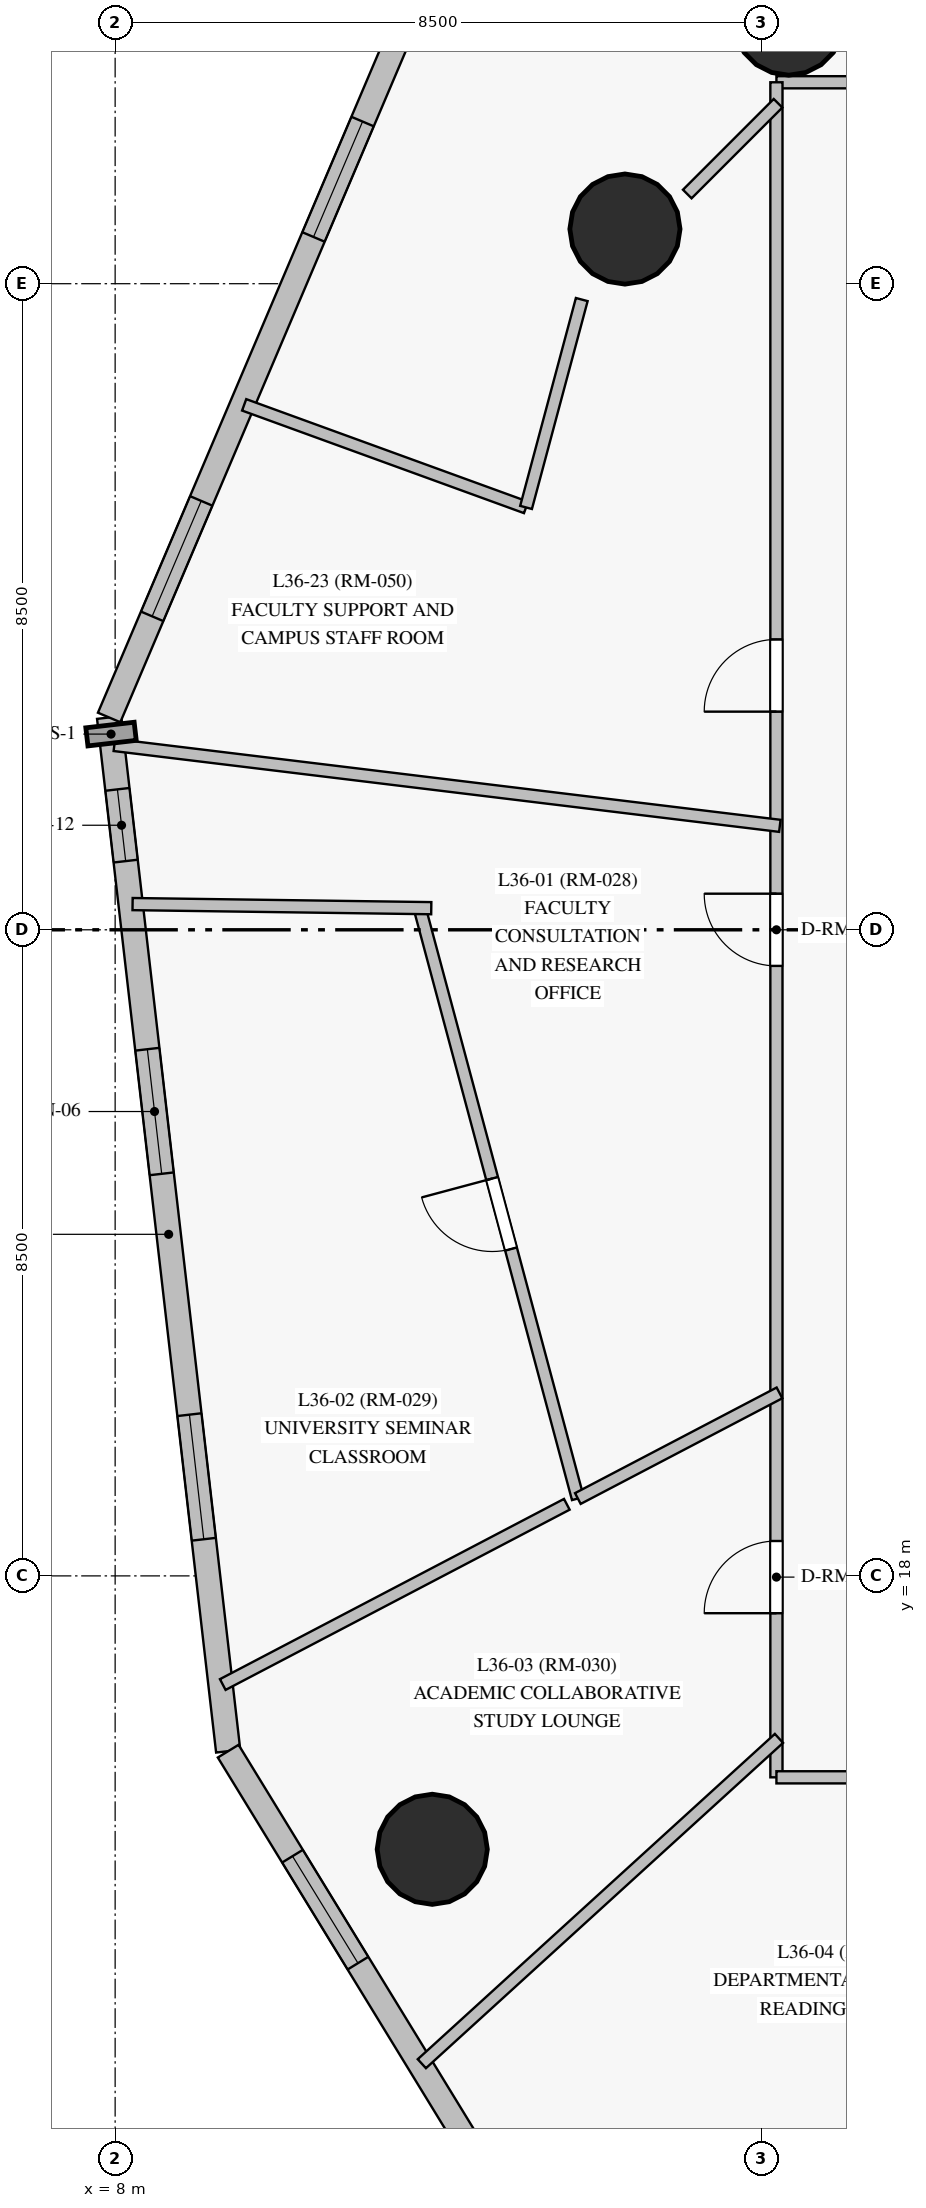
"""IFC4 building model, lengths in metres.
Left out: names, types, materials, properties, quantities, classifications, styles, units other than length and angle.
Written with IfcOpenShell. Run it as: python <this file> out.ifc"""

import sys

from ifc_helpers import new_model, si_unit, direction, frame, frame_2d, origin, origin_with_axes, origin_2d, place, context, subcontext, project, spatial, rectangle, circle, extrude, source, transform, mapped, element, fill, save


model = new_model("IFC4")
c1 = context("Model", 3, precision=1e-05, world=origin(), true_north=direction((0.0, 1.0)))
c2 = subcontext(c1, "Body", "Model", "MODEL_VIEW")
j1 = project(units=[si_unit("LENGTHUNIT", "METRE"), si_unit("PLANEANGLEUNIT", "RADIAN")], contexts=[c1])
p1 = place(None, origin())
s1 = spatial("IfcSite", under=j1, at=p1, CompositionType="ELEMENT")
p2 = place(p1, origin())
s2 = spatial("IfcBuilding", under=s1, at=p2, CompositionType="ELEMENT")
p3 = place(p2, frame((0.0, 0.0, 129.75)))
s3 = spatial("IfcBuildingStorey", under=s2, at=p3, CompositionType="ELEMENT", Elevation=129.75)
m1 = source(origin_with_axes(), c2, "Body", "SweptSolid", [
    extrude(circle(Radius=0.725, at=origin_2d()), origin(), (0.0, 0.0, 1.0), 3.05),
])
for number, where, z_axis, x_axis in (
    (1, (16.862, 38.468, 0.0), (0.0, 0.0, 1.0), (1.0, 0.0, 0.0)),
    (2, (14.707, 35.719, 0.0), (0.0, 0.0, 1.0), (1.0, 0.0, 0.0)),
    (3, (12.172, 14.403, 0.0), (0.0, 0.0, 1.0), (1.0, 0.0, 0.0)),
):
    element("IfcColumn", number, at=place(p3, frame(where, z_axis=z_axis, x_axis=x_axis)), inside=s3, PredefinedType="COLUMN", context=c2, shape_type="MappedRepresentation", body=[
        mapped(m1, transform((0.0, 0.0, 0.0), scale=1.0)),
    ])
p4 = place(p3, frame((7.921, 29.293, 0.0), z_axis=(0.0, 0.0, 1.0), x_axis=(0.114427793252, -0.993431567916, 0.0)))
e4 = element("IfcWall", 4, at=p4, inside=s3, PredefinedType="SOLIDWALL", context=c2, shape_type="SweptSolid", body=[
    extrude(rectangle(XDim=13.689, YDim=0.32, at=frame_2d((6.844, 0.0))), origin(), (0.0, 0.0, 1.0), 2.825),
])
p5 = place(p4, frame((0.952, 0.0, 0.85)))
e5 = element("IfcOpeningElement", 5, at=p5, cuts=e4, PredefinedType="OPENING", context=c2, shape_type="SweptSolid", body=[
    extrude(rectangle(XDim=0.95, YDim=1.5, at=frame_2d((0.475, 0.75))), frame((0.0, 0.17, 0.0), z_axis=(0.0, -1.0, 0.0), x_axis=(1.0, 0.0, 0.0)), (0.0, 0.0, 1.0), 0.34),
])
p6 = place(p4, frame((4.393, 0.0, 0.85)))
e6 = element("IfcOpeningElement", 6, at=p6, cuts=e4, PredefinedType="OPENING", context=c2, shape_type="SweptSolid", body=[
    extrude(rectangle(XDim=1.65, YDim=1.65, at=frame_2d((0.825, 0.825))), frame((0.0, 0.17, 0.0), z_axis=(0.0, -1.0, 0.0), x_axis=(1.0, 0.0, 0.0)), (0.0, 0.0, 1.0), 0.34),
])
p7 = place(p4, frame((9.233, 0.0, 0.85)))
e7 = element("IfcOpeningElement", 7, at=p7, cuts=e4, PredefinedType="OPENING", context=c2, shape_type="SweptSolid", body=[
    extrude(rectangle(XDim=1.65, YDim=1.65, at=frame_2d((0.825, 0.825))), frame((0.0, 0.17, 0.0), z_axis=(0.0, -1.0, 0.0), x_axis=(1.0, 0.0, 0.0)), (0.0, 0.0, 1.0), 0.34),
])
p8 = place(p3, frame((9.487, 15.694, 0.0), z_axis=(0.0, 0.0, 1.0), x_axis=(0.522110215284, -0.852878023574, 0.0)))
e8 = element("IfcWall", 8, at=p8, inside=s3, PredefinedType="SOLIDWALL", context=c2, shape_type="SweptSolid", body=[
    extrude(rectangle(XDim=9.466, YDim=0.32, at=frame_2d((4.733, 0.0))), origin(), (0.0, 0.0, 1.0), 2.825),
])
p9 = place(p8, frame((1.62, 0.0, 0.85)))
e9 = element("IfcOpeningElement", 9, at=p9, cuts=e8, PredefinedType="OPENING", context=c2, shape_type="SweptSolid", body=[
    extrude(rectangle(XDim=1.65, YDim=1.65, at=frame_2d((0.825, 0.825))), frame((0.0, 0.17, 0.0), z_axis=(0.0, -1.0, 0.0), x_axis=(1.0, 0.0, 0.0)), (0.0, 0.0, 1.0), 0.34),
])
p10 = place(p8, frame((6.293, 0.0, 0.85)))
e10 = element("IfcOpeningElement", 10, at=p10, cuts=e8, PredefinedType="OPENING", context=c2, shape_type="SweptSolid", body=[
    extrude(rectangle(XDim=1.65, YDim=1.65, at=frame_2d((0.825, 0.825))), frame((0.0, 0.17, 0.0), z_axis=(0.0, -1.0, 0.0), x_axis=(1.0, 0.0, 0.0)), (0.0, 0.0, 1.0), 0.34),
])
p11 = place(p3, frame((12.213, 39.386, 0.0), z_axis=(0.0, 0.0, 1.0), x_axis=(-0.391384325622, -0.920227314123, 0.0)))
e11 = element("IfcWall", 11, at=p11, inside=s3, PredefinedType="SOLIDWALL", context=c2, shape_type="SweptSolid", body=[
    extrude(rectangle(XDim=10.968, YDim=0.32, at=frame_2d((5.484, 0.0))), origin(), (0.0, 0.0, 1.0), 2.825),
])
p12 = place(p11, frame((2.448, 0.0, 0.85)))
e12 = element("IfcOpeningElement", 12, at=p12, cuts=e11, PredefinedType="OPENING", context=c2, shape_type="SweptSolid", body=[
    extrude(rectangle(XDim=1.65, YDim=1.65, at=frame_2d((0.825, 0.825))), frame((0.0, 0.17, 0.0), z_axis=(0.0, -1.0, 0.0), x_axis=(1.0, 0.0, 0.0)), (0.0, 0.0, 1.0), 0.34),
])
p13 = place(p11, frame((7.871, 0.0, 0.85)))
e13 = element("IfcOpeningElement", 13, at=p13, cuts=e11, PredefinedType="OPENING", context=c2, shape_type="SweptSolid", body=[
    extrude(rectangle(XDim=1.65, YDim=1.65, at=frame_2d((0.825, 0.825))), frame((0.0, 0.17, 0.0), z_axis=(0.0, -1.0, 0.0), x_axis=(1.0, 0.0, 0.0)), (0.0, 0.0, 1.0), 0.34),
])
p14 = place(p3, frame((16.7, 37.65, 0.0), z_axis=(0.0, 0.0, 1.0), x_axis=(1.0, 0.0, 0.0)))
e14 = element("IfcWall", 14, at=p14, inside=s3, PredefinedType="PARTITIONING", context=c2, shape_type="SweptSolid", body=[
    extrude(rectangle(XDim=23.5, YDim=0.16, at=frame_2d((11.75, 0.0))), origin(), (0.0, 0.0, 1.0), 2.325),
])
p15 = place(p14, frame((20.465, 0.0, 0.0)))
e15 = element("IfcOpeningElement", 15, at=p15, cuts=e14, PredefinedType="OPENING", context=c2, shape_type="SweptSolid", body=[
    extrude(rectangle(XDim=0.96, YDim=2.15, at=frame_2d((0.48, 1.075))), frame((0.0, 0.09, 0.0), z_axis=(0.0, -1.0, 0.0), x_axis=(1.0, 0.0, 0.0)), (0.0, 0.0, 1.0), 0.18),
])
p16 = place(p14, frame((17.06, 0.0, 0.0)))
e16 = element("IfcOpeningElement", 16, at=p16, cuts=e14, PredefinedType="OPENING", context=c2, shape_type="SweptSolid", body=[
    extrude(rectangle(XDim=0.95, YDim=2.15, at=frame_2d((0.475, 1.075))), frame((0.0, 0.09, 0.0), z_axis=(0.0, -1.0, 0.0), x_axis=(1.0, 0.0, 0.0)), (0.0, 0.0, 1.0), 0.18),
])
p17 = place(p14, frame((14.71, 0.0, 0.0)))
e17 = element("IfcOpeningElement", 17, at=p17, cuts=e14, PredefinedType="OPENING", context=c2, shape_type="SweptSolid", body=[
    extrude(rectangle(XDim=0.96, YDim=2.15, at=frame_2d((0.48, 1.075))), frame((0.0, 0.09, 0.0), z_axis=(0.0, -1.0, 0.0), x_axis=(1.0, 0.0, 0.0)), (0.0, 0.0, 1.0), 0.18),
])
p18 = place(p14, frame((10.785, 0.0, 0.0)))
e18 = element("IfcOpeningElement", 18, at=p18, cuts=e14, PredefinedType="OPENING", context=c2, shape_type="SweptSolid", body=[
    extrude(rectangle(XDim=0.95, YDim=2.15, at=frame_2d((0.475, 1.075))), frame((0.0, 0.09, 0.0), z_axis=(0.0, -1.0, 0.0), x_axis=(1.0, 0.0, 0.0)), (0.0, 0.0, 1.0), 0.18),
])
p19 = place(p14, frame((7.75, 0.0, 0.0)))
e19 = element("IfcOpeningElement", 19, at=p19, cuts=e14, PredefinedType="OPENING", context=c2, shape_type="SweptSolid", body=[
    extrude(rectangle(XDim=0.95, YDim=2.15, at=frame_2d((0.475, 1.075))), frame((0.0, 0.09, 0.0), z_axis=(0.0, -1.0, 0.0), x_axis=(1.0, 0.0, 0.0)), (0.0, 0.0, 1.0), 0.18),
])
p20 = place(p14, frame((6.195, 0.0, 0.0)))
e20 = element("IfcOpeningElement", 20, at=p20, cuts=e14, PredefinedType="OPENING", context=c2, shape_type="SweptSolid", body=[
    extrude(rectangle(XDim=0.86, YDim=2.1, at=frame_2d((0.43, 1.05))), frame((0.0, 0.09, 0.0), z_axis=(0.0, -1.0, 0.0), x_axis=(1.0, 0.0, 0.0)), (0.0, 0.0, 1.0), 0.18),
])
p21 = place(p3, frame((16.7, 15.35, 0.0), z_axis=(0.0, 0.0, 1.0), x_axis=(0.0, 1.0, 0.0)))
e21 = element("IfcWall", 21, at=p21, inside=s3, PredefinedType="PARTITIONING", context=c2, shape_type="SweptSolid", body=[
    extrude(rectangle(XDim=22.3, YDim=0.16, at=frame_2d((11.15, 0.0))), origin(), (0.0, 0.0, 1.0), 2.225),
])
p22 = place(p21, frame((10.675, 0.0, 0.0)))
e22 = element("IfcOpeningElement", 22, at=p22, cuts=e21, PredefinedType="OPENING", context=c2, shape_type="SweptSolid", body=[
    extrude(rectangle(XDim=0.95, YDim=2.15, at=frame_2d((0.475, 1.075))), frame((0.0, 0.09, 0.0), z_axis=(0.0, -1.0, 0.0), x_axis=(1.0, 0.0, 0.0)), (0.0, 0.0, 1.0), 0.18),
])
p23 = place(p21, frame((2.159, 0.0, 0.0)))
e23 = element("IfcOpeningElement", 23, at=p23, cuts=e21, PredefinedType="OPENING", context=c2, shape_type="SweptSolid", body=[
    extrude(rectangle(XDim=0.95, YDim=2.15, at=frame_2d((0.475, 1.075))), frame((0.0, 0.09, 0.0), z_axis=(0.0, -1.0, 0.0), x_axis=(1.0, 0.0, 0.0)), (0.0, 0.0, 1.0), 0.18),
])
p24 = place(p21, frame((14.02, 0.0, 0.0)))
e24 = element("IfcOpeningElement", 24, at=p24, cuts=e21, PredefinedType="OPENING", context=c2, shape_type="SweptSolid", body=[
    extrude(rectangle(XDim=0.95, YDim=2.15, at=frame_2d((0.475, 1.075))), frame((0.0, 0.09, 0.0), z_axis=(0.0, -1.0, 0.0), x_axis=(1.0, 0.0, 0.0)), (0.0, 0.0, 1.0), 0.18),
])
p25 = place(p3, frame((27.55, 15.35, 0.0), z_axis=(0.0, 0.0, 1.0), x_axis=(-1.0, 0.0, 0.0)))
e25 = element("IfcWall", 25, at=p25, inside=s3, PredefinedType="PARTITIONING", context=c2, shape_type="SweptSolid", body=[
    extrude(rectangle(XDim=10.85, YDim=0.16, at=frame_2d((5.425, 0.0))), origin(), (0.0, 0.0, 1.0), 2.325),
])
p26 = place(p25, frame((6.577, 0.0, 0.0)))
e26 = element("IfcOpeningElement", 26, at=p26, cuts=e25, PredefinedType="OPENING", context=c2, shape_type="SweptSolid", body=[
    extrude(rectangle(XDim=0.95, YDim=2.15, at=frame_2d((0.475, 1.075))), frame((0.0, 0.09, 0.0), z_axis=(0.0, -1.0, 0.0), x_axis=(1.0, 0.0, 0.0)), (0.0, 0.0, 1.0), 0.18),
])
p27 = place(p25, frame((3.512, 0.0, 0.0)))
e27 = element("IfcOpeningElement", 27, at=p27, cuts=e25, PredefinedType="OPENING", context=c2, shape_type="SweptSolid", body=[
    extrude(rectangle(XDim=0.95, YDim=2.15, at=frame_2d((0.475, 1.075))), frame((0.0, 0.09, 0.0), z_axis=(0.0, -1.0, 0.0), x_axis=(1.0, 0.0, 0.0)), (0.0, 0.0, 1.0), 0.18),
])
p28 = place(p25, frame((1.948, 0.0, 0.0)))
e28 = element("IfcOpeningElement", 28, at=p28, cuts=e25, PredefinedType="OPENING", context=c2, shape_type="SweptSolid", body=[
    extrude(rectangle(XDim=0.95, YDim=2.15, at=frame_2d((0.475, 1.075))), frame((0.0, 0.09, 0.0), z_axis=(0.0, -1.0, 0.0), x_axis=(1.0, 0.0, 0.0)), (0.0, 0.0, 1.0), 0.18),
])
p29 = place(p3, frame((22.207, 15.376, 0.0), z_axis=(0.0, 0.0, 1.0), x_axis=(-0.488271237189, -0.872691926704, 0.0)))
e29 = element("IfcWall", 29, at=p29, inside=s3, PredefinedType="PARTITIONING", context=c2, shape_type="SweptSolid", body=[
    extrude(rectangle(XDim=10.544, YDim=0.16, at=frame_2d((5.272, 0.0))), origin(), (0.0, 0.0, 1.0), 2.825),
])
p30 = place(p3, frame((7.99, 28.931, 0.0), z_axis=(0.0, 0.0, 1.0), x_axis=(0.992703690009, -0.120579367399, 0.0)))
e30 = element("IfcWall", 30, at=p30, inside=s3, PredefinedType="PARTITIONING", context=c2, shape_type="SweptSolid", body=[
    extrude(rectangle(XDim=8.82, YDim=0.16, at=frame_2d((4.41, 0.0))), origin(), (0.0, 0.0, 1.0), 2.825),
])
p31 = place(p3, frame((14.088, 19.018, 0.0), z_axis=(0.0, 0.0, 1.0), x_axis=(-0.258806942907, 0.965929068981, 0.0)))
e31 = element("IfcWall", 31, at=p31, inside=s3, PredefinedType="PARTITIONING", context=c2, shape_type="SweptSolid", body=[
    extrude(rectangle(XDim=7.98, YDim=0.16, at=frame_2d((3.99, 0.0))), origin(), (0.0, 0.0, 1.0), 2.225),
])
p32 = place(p31, frame((3.398, 0.0, 0.0)))
e32 = element("IfcOpeningElement", 32, at=p32, cuts=e31, PredefinedType="OPENING", context=c2, shape_type="SweptSolid", body=[
    extrude(rectangle(XDim=0.96, YDim=2.15, at=frame_2d((0.48, 1.075))), frame((0.0, 0.09, 0.0), z_axis=(0.0, -1.0, 0.0), x_axis=(1.0, 0.0, 0.0)), (0.0, 0.0, 1.0), 0.18),
])
p33 = place(p3, frame((16.733, 15.862, 0.0), z_axis=(0.0, 0.0, 1.0), x_axis=(-0.739260079392, -0.673420028673, 0.0)))
e33 = element("IfcWall", 33, at=p33, inside=s3, PredefinedType="PARTITIONING", context=c2, shape_type="SweptSolid", body=[
    extrude(rectangle(XDim=6.356, YDim=0.16, at=frame_2d((3.178, 0.0))), origin(), (0.0, 0.0, 1.0), 2.825),
])
p34 = place(p3, frame((13.942, 18.942, 0.0), z_axis=(0.0, 0.0, 1.0), x_axis=(-0.885820312937, -0.464028418514, 0.0)))
e34 = element("IfcWall", 34, at=p34, inside=s3, PredefinedType="PARTITIONING", context=c2, shape_type="SweptSolid", body=[
    extrude(rectangle(XDim=5.11, YDim=0.16, at=frame_2d((2.555, 0.0))), origin(), (0.0, 0.0, 1.0), 2.825),
])
p35 = place(p3, frame((13.406, 32.057, 0.0), z_axis=(0.0, 0.0, 1.0), x_axis=(-0.939706694021, 0.341981474954, 0.0)))
e35 = element("IfcWall", 35, at=p35, inside=s3, PredefinedType="PARTITIONING", context=c2, shape_type="SweptSolid", body=[
    extrude(rectangle(XDim=3.947, YDim=0.16, at=frame_2d((1.973, 0.0))), origin(), (0.0, 0.0, 1.0), 2.825),
])
p36 = place(p3, frame((12.159, 26.784, 0.0), z_axis=(0.0, 0.0, 1.0), x_axis=(-0.999905743527, 0.013729678119, 0.0)))
e36 = element("IfcWall", 36, at=p36, inside=s3, PredefinedType="PARTITIONING", context=c2, shape_type="SweptSolid", body=[
    extrude(rectangle(XDim=3.93, YDim=0.16, at=frame_2d((1.965, 0.0))), origin(), (0.0, 0.0, 1.0), 2.825),
])
p37 = place(p3, frame((16.74, 20.407, 0.0), z_axis=(0.0, 0.0, 1.0), x_axis=(-0.885820363554, -0.464028321887, 0.0)))
e37 = element("IfcWall", 37, at=p37, inside=s3, PredefinedType="PARTITIONING", context=c2, shape_type="SweptSolid", body=[
    extrude(rectangle(XDim=2.994, YDim=0.16, at=frame_2d((1.497, 0.0))), origin(), (0.0, 0.0, 1.0), 2.825),
])
p38 = place(p3, frame((14.139, 34.792, 0.0), z_axis=(0.0, 0.0, 1.0), x_axis=(-0.258853892004, -0.965916488416, 0.0)))
e38 = element("IfcWall", 38, at=p38, inside=s3, PredefinedType="PARTITIONING", context=c2, shape_type="SweptSolid", body=[
    extrude(rectangle(XDim=2.831, YDim=0.16, at=frame_2d((1.416, 0.0))), origin(), (0.0, 0.0, 1.0), 2.225),
])
p39 = place(p3, frame((16.721, 37.374, 0.0), z_axis=(0.0, 0.0, 1.0), x_axis=(-0.707034498357, -0.707179056627, 0.0)))
e39 = element("IfcWall", 39, at=p39, inside=s3, PredefinedType="PARTITIONING", context=c2, shape_type="SweptSolid", body=[
    extrude(rectangle(XDim=1.689, YDim=0.16, at=frame_2d((0.844, 0.0))), origin(), (0.0, 0.0, 1.0), 2.225),
])
m2 = source(origin_with_axes(), c2, "Body", "SweptSolid", [
    extrude(rectangle(XDim=0.95, YDim=1.5, at=frame_2d((0.475, 0.75))), frame((0.0, 0.03, 0.0), z_axis=(0.0, -1.0, 0.0), x_axis=(1.0, 0.0, 0.0)), (0.0, 0.0, 1.0), 0.06),
])
p40 = place(p5, origin())
e40 = element("IfcWindow", 40, at=p40, inside=s3, PartitioningType="SINGLE_PANEL", PredefinedType="WINDOW", context=c2, shape_type="MappedRepresentation", body=[
    mapped(m2, transform((0.0, 0.0, 0.0), scale=1.0)),
])
fill(e5, e40)
m3 = source(origin_with_axes(), c2, "Body", "SweptSolid", [
    extrude(rectangle(XDim=1.65, YDim=1.65, at=frame_2d((0.825, 0.825))), frame((0.0, 0.03, 0.0), z_axis=(0.0, -1.0, 0.0), x_axis=(1.0, 0.0, 0.0)), (0.0, 0.0, 1.0), 0.06),
])
p41 = place(p6, origin())
e41 = element("IfcWindow", 41, at=p41, inside=s3, PartitioningType="SINGLE_PANEL", PredefinedType="WINDOW", context=c2, shape_type="MappedRepresentation", body=[
    mapped(m3, transform((0.0, 0.0, 0.0), scale=1.0)),
])
fill(e6, e41)
p42 = place(p7, origin())
e42 = element("IfcWindow", 42, at=p42, inside=s3, PartitioningType="SINGLE_PANEL", PredefinedType="WINDOW", context=c2, shape_type="MappedRepresentation", body=[
    mapped(m3, transform((0.0, 0.0, 0.0), scale=1.0)),
])
fill(e7, e42)
p43 = place(p9, origin())
e43 = element("IfcWindow", 43, at=p43, inside=s3, PartitioningType="SINGLE_PANEL", PredefinedType="WINDOW", context=c2, shape_type="MappedRepresentation", body=[
    mapped(m3, transform((0.0, 0.0, 0.0), scale=1.0)),
])
fill(e9, e43)
p44 = place(p12, origin())
e44 = element("IfcWindow", 44, at=p44, inside=s3, PartitioningType="SINGLE_PANEL", PredefinedType="WINDOW", context=c2, shape_type="MappedRepresentation", body=[
    mapped(m3, transform((0.0, 0.0, 0.0), scale=1.0)),
])
fill(e12, e44)
p45 = place(p13, origin())
e45 = element("IfcWindow", 45, at=p45, inside=s3, PartitioningType="SINGLE_PANEL", PredefinedType="WINDOW", context=c2, shape_type="MappedRepresentation", body=[
    mapped(m3, transform((0.0, 0.0, 0.0), scale=1.0)),
])
fill(e13, e45)
m4 = source(origin_with_axes(), c2, "Body", "SweptSolid", [
    extrude(rectangle(XDim=0.95, YDim=2.15, at=frame_2d((0.475, 1.075))), frame((0.0, 0.025, 0.0), z_axis=(0.0, -1.0, 0.0), x_axis=(1.0, 0.0, 0.0)), (0.0, 0.0, 1.0), 0.05),
])
p46 = place(p22, origin())
e46 = element("IfcDoor", 46, at=p46, inside=s3, OperationType="SINGLE_SWING_RIGHT", PredefinedType="DOOR", context=c2, shape_type="MappedRepresentation", body=[
    mapped(m4, transform((0.0, 0.0, 0.0), scale=1.0)),
])
fill(e22, e46)
p47 = place(p23, origin())
e47 = element("IfcDoor", 47, at=p47, inside=s3, OperationType="SINGLE_SWING_LEFT", PredefinedType="DOOR", context=c2, shape_type="MappedRepresentation", body=[
    mapped(m4, transform((0.0, 0.0, 0.0), scale=1.0)),
])
fill(e23, e47)
p48 = place(p24, origin())
e48 = element("IfcDoor", 48, at=p48, inside=s3, OperationType="SINGLE_SWING_LEFT", PredefinedType="DOOR", context=c2, shape_type="MappedRepresentation", body=[
    mapped(m4, transform((0.0, 0.0, 0.0), scale=1.0)),
])
fill(e24, e48)
m5 = source(origin_with_axes(), c2, "Body", "SweptSolid", [
    extrude(rectangle(XDim=0.96, YDim=2.15, at=frame_2d((0.48, 1.075))), frame((0.0, 0.025, 0.0), z_axis=(0.0, -1.0, 0.0), x_axis=(1.0, 0.0, 0.0)), (0.0, 0.0, 1.0), 0.05),
])
p49 = place(p32, origin())
e49 = element("IfcDoor", 49, at=p49, inside=s3, OperationType="SINGLE_SWING_RIGHT", PredefinedType="DOOR", context=c2, shape_type="MappedRepresentation", body=[
    mapped(m5, transform((0.0, 0.0, 0.0), scale=1.0)),
])
fill(e32, e49)
save(model, sys.argv[1])
